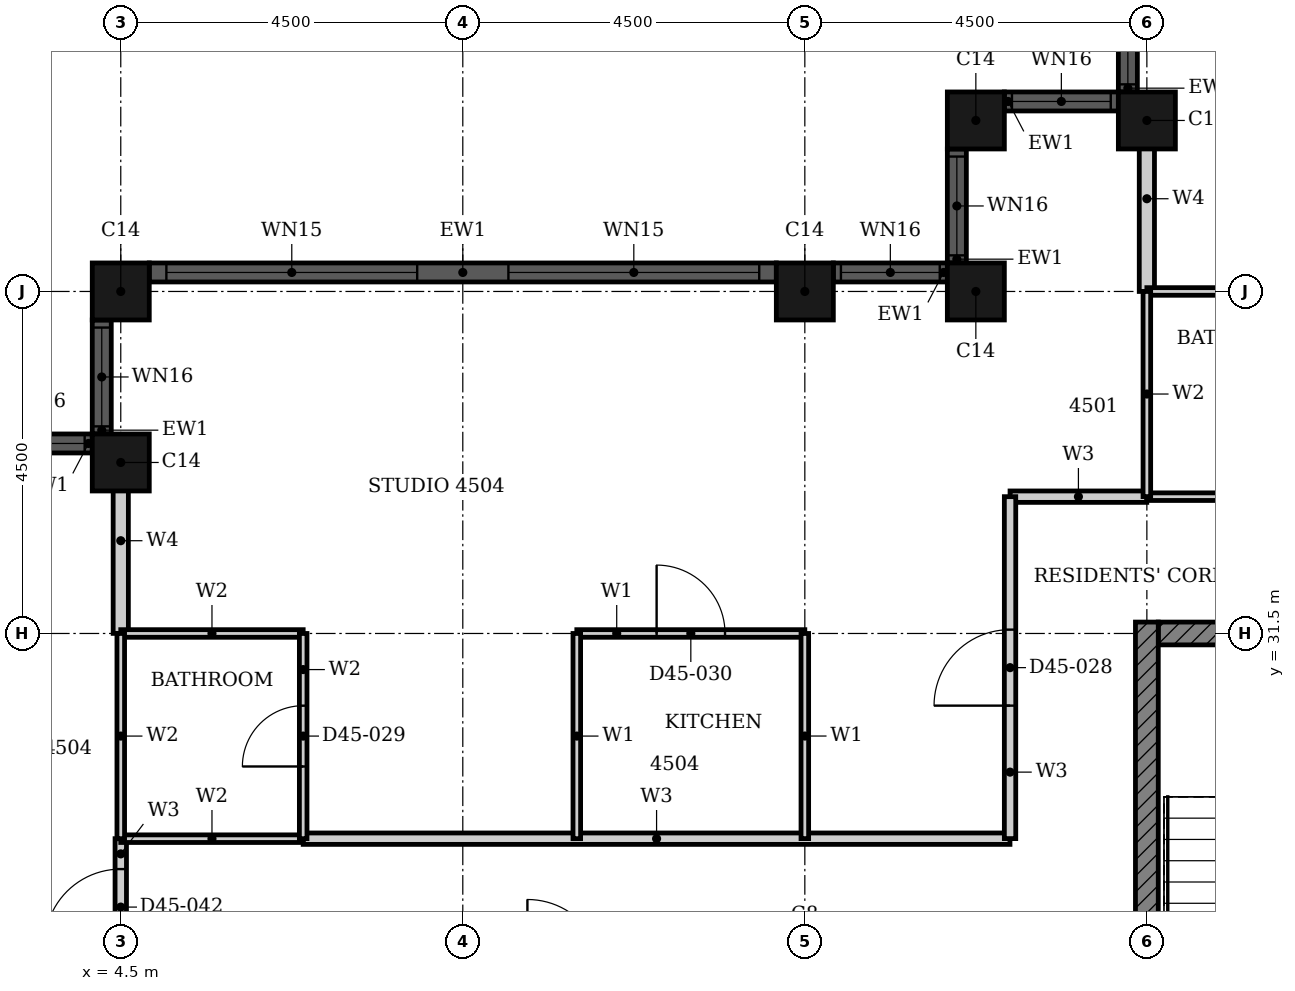
"""IFC4 building model, lengths in metres.
Left out: names, types, materials, properties, quantities, classifications, styles, units other than length and angle.
Written with IfcOpenShell. Run it as: python <this file> out.ifc"""

import sys

from ifc_helpers import new_model, si_unit, direction, frame, frame_2d, origin, origin_2d, place, context, subcontext, project, spatial, rectangle, hollow_rectangle, extrude, element, fill, save


model = new_model("IFC4")
c1 = context("Model", 3, precision=1e-05, world=origin(), true_north=direction((0.0, 1.0)))
c2 = subcontext(c1, "Body", "Model", "MODEL_VIEW")
j1 = project(units=[si_unit("LENGTHUNIT", "METRE"), si_unit("PLANEANGLEUNIT", "RADIAN")], contexts=[c1])
p1 = place(None, origin())
s1 = spatial("IfcSite", under=j1, at=p1, CompositionType="ELEMENT")
p2 = place(p1, origin())
s2 = spatial("IfcBuilding", under=s1, at=p2, CompositionType="ELEMENT")
p3 = place(p2, frame((0.0, 0.0, 180.2)))
s3 = spatial("IfcBuildingStorey", under=s2, at=p3, CompositionType="ELEMENT", Elevation=180.2)
for number, where, z_axis, x_axis in (
    (1, (18.0, 38.25, 0.0), (0.0, 0.0, 1.0), (1.0, 0.0, 0.0)),
    (2, (15.75, 38.25, 0.0), (0.0, 0.0, 1.0), (1.0, 0.0, 0.0)),
    (3, (15.75, 36.0, 0.0), (0.0, 0.0, 1.0), (1.0, 0.0, 0.0)),
    (4, (13.5, 36.0, 0.0), (0.0, 0.0, 1.0), (1.0, 0.0, 0.0)),
    (5, (4.5, 36.0, 0.0), (0.0, 0.0, 1.0), (1.0, 0.0, 0.0)),
    (6, (4.5, 33.75, 0.0), (0.0, 0.0, 1.0), (1.0, 0.0, 0.0)),
):
    element("IfcColumn", number, at=place(p3, frame(where, z_axis=z_axis, x_axis=x_axis)), inside=s3, PredefinedType="COLUMN", context=c2, shape_type="SweptSolid", body=[
        extrude(hollow_rectangle(XDim=0.75, YDim=0.75, WallThickness=0.024, at=origin_2d()), origin(), (0.0, 0.0, 1.0), 3.7),
    ])
p4 = place(p3, frame((17.75, 40.125, 0.0), z_axis=(0.0, 0.0, 1.0), x_axis=(0.0, -1.0, 0.0)))
e7 = element("IfcWall", 7, at=p4, inside=s3, PredefinedType="SOLIDWALL", context=c2, shape_type="SweptSolid", body=[
    extrude(rectangle(XDim=1.5, YDim=0.25, at=frame_2d((0.75, 0.0))), origin(), (0.0, 0.0, 1.0), 3.7),
])
p5 = place(p4, frame((0.1, 0.0, 0.9)))
e8 = element("IfcOpeningElement", 8, at=p5, cuts=e7, PredefinedType="OPENING", context=c2, shape_type="SweptSolid", body=[
    extrude(rectangle(XDim=1.3, YDim=1.85, at=frame_2d((0.65, 0.925))), frame((0.0, 0.135, 0.0), z_axis=(0.0, -1.0, 0.0), x_axis=(1.0, 0.0, 0.0)), (0.0, 0.0, 1.0), 0.27),
])
p6 = place(p3, frame((17.625, 38.5, 0.0), z_axis=(0.0, 0.0, 1.0), x_axis=(-1.0, 0.0, 0.0)))
e9 = element("IfcWall", 9, at=p6, inside=s3, PredefinedType="SOLIDWALL", context=c2, shape_type="SweptSolid", body=[
    extrude(rectangle(XDim=1.5, YDim=0.25, at=frame_2d((0.75, 0.0))), origin(), (0.0, 0.0, 1.0), 3.7),
])
p7 = place(p6, frame((0.1, 0.0, 0.9)))
e10 = element("IfcOpeningElement", 10, at=p7, cuts=e9, PredefinedType="OPENING", context=c2, shape_type="SweptSolid", body=[
    extrude(rectangle(XDim=1.3, YDim=1.85, at=frame_2d((0.65, 0.925))), frame((0.0, 0.135, 0.0), z_axis=(0.0, -1.0, 0.0), x_axis=(1.0, 0.0, 0.0)), (0.0, 0.0, 1.0), 0.27),
])
p8 = place(p3, frame((15.5, 37.875, 0.0), z_axis=(0.0, 0.0, 1.0), x_axis=(0.0, -1.0, 0.0)))
e11 = element("IfcWall", 11, at=p8, inside=s3, PredefinedType="SOLIDWALL", context=c2, shape_type="SweptSolid", body=[
    extrude(rectangle(XDim=1.5, YDim=0.25, at=frame_2d((0.75, 0.0))), origin(), (0.0, 0.0, 1.0), 3.7),
])
p9 = place(p8, frame((0.1, 0.0, 0.9)))
e12 = element("IfcOpeningElement", 12, at=p9, cuts=e11, PredefinedType="OPENING", context=c2, shape_type="SweptSolid", body=[
    extrude(rectangle(XDim=1.3, YDim=1.85, at=frame_2d((0.65, 0.925))), frame((0.0, 0.135, 0.0), z_axis=(0.0, -1.0, 0.0), x_axis=(1.0, 0.0, 0.0)), (0.0, 0.0, 1.0), 0.27),
])
p10 = place(p3, frame((15.375, 36.25, 0.0), z_axis=(0.0, 0.0, 1.0), x_axis=(-1.0, 0.0, 0.0)))
e13 = element("IfcWall", 13, at=p10, inside=s3, PredefinedType="SOLIDWALL", context=c2, shape_type="SweptSolid", body=[
    extrude(rectangle(XDim=1.5, YDim=0.25, at=frame_2d((0.75, 0.0))), origin(), (0.0, 0.0, 1.0), 3.7),
])
p11 = place(p10, frame((0.1, 0.0, 0.9)))
e14 = element("IfcOpeningElement", 14, at=p11, cuts=e13, PredefinedType="OPENING", context=c2, shape_type="SweptSolid", body=[
    extrude(rectangle(XDim=1.3, YDim=1.85, at=frame_2d((0.65, 0.925))), frame((0.0, 0.135, 0.0), z_axis=(0.0, -1.0, 0.0), x_axis=(1.0, 0.0, 0.0)), (0.0, 0.0, 1.0), 0.27),
])
p12 = place(p3, frame((13.125, 36.25, 0.0), z_axis=(0.0, 0.0, 1.0), x_axis=(-1.0, 0.0, 0.0)))
e15 = element("IfcWall", 15, at=p12, inside=s3, PredefinedType="SOLIDWALL", context=c2, shape_type="SweptSolid", body=[
    extrude(rectangle(XDim=8.25, YDim=0.25, at=frame_2d((4.125, 0.0))), origin(), (0.0, 0.0, 1.0), 3.7),
])
p13 = place(p12, frame((0.225, 0.0, 0.45)))
e16 = element("IfcOpeningElement", 16, at=p13, cuts=e15, PredefinedType="OPENING", context=c2, shape_type="SweptSolid", body=[
    extrude(rectangle(XDim=3.3, YDim=2.3, at=frame_2d((1.65, 1.15))), frame((0.0, 0.135, 0.0), z_axis=(0.0, -1.0, 0.0), x_axis=(1.0, 0.0, 0.0)), (0.0, 0.0, 1.0), 0.27),
])
p14 = place(p12, frame((4.725, 0.0, 0.45)))
e17 = element("IfcOpeningElement", 17, at=p14, cuts=e15, PredefinedType="OPENING", context=c2, shape_type="SweptSolid", body=[
    extrude(rectangle(XDim=3.3, YDim=2.3, at=frame_2d((1.65, 1.15))), frame((0.0, 0.135, 0.0), z_axis=(0.0, -1.0, 0.0), x_axis=(1.0, 0.0, 0.0)), (0.0, 0.0, 1.0), 0.27),
])
p15 = place(p3, frame((4.25, 35.625, 0.0), z_axis=(0.0, 0.0, 1.0), x_axis=(0.0, -1.0, 0.0)))
e18 = element("IfcWall", 18, at=p15, inside=s3, PredefinedType="SOLIDWALL", context=c2, shape_type="SweptSolid", body=[
    extrude(rectangle(XDim=1.5, YDim=0.25, at=frame_2d((0.75, 0.0))), origin(), (0.0, 0.0, 1.0), 3.7),
])
p16 = place(p15, frame((0.1, 0.0, 0.9)))
e19 = element("IfcOpeningElement", 19, at=p16, cuts=e18, PredefinedType="OPENING", context=c2, shape_type="SweptSolid", body=[
    extrude(rectangle(XDim=1.3, YDim=1.85, at=frame_2d((0.65, 0.925))), frame((0.0, 0.135, 0.0), z_axis=(0.0, -1.0, 0.0), x_axis=(1.0, 0.0, 0.0)), (0.0, 0.0, 1.0), 0.27),
])
p17 = place(p3, frame((4.125, 34.0, 0.0), z_axis=(0.0, 0.0, 1.0), x_axis=(-1.0, 0.0, 0.0)))
e20 = element("IfcWall", 20, at=p17, inside=s3, PredefinedType="SOLIDWALL", context=c2, shape_type="SweptSolid", body=[
    extrude(rectangle(XDim=1.5, YDim=0.25, at=frame_2d((0.75, 0.0))), origin(), (0.0, 0.0, 1.0), 3.7),
])
p18 = place(p17, frame((0.1, 0.0, 0.9)))
e21 = element("IfcOpeningElement", 21, at=p18, cuts=e20, PredefinedType="OPENING", context=c2, shape_type="SweptSolid", body=[
    extrude(rectangle(XDim=1.3, YDim=1.85, at=frame_2d((0.65, 0.925))), frame((0.0, 0.135, 0.0), z_axis=(0.0, -1.0, 0.0), x_axis=(1.0, 0.0, 0.0)), (0.0, 0.0, 1.0), 0.27),
])
p19 = place(p3, frame((18.15, 31.5, 0.0), z_axis=(0.0, 0.0, 1.0), x_axis=(1.0, 0.0, 0.0)))
e22 = element("IfcWall", 22, at=p19, inside=s3, PredefinedType="SHEAR", context=c2, shape_type="SweptSolid", body=[
    extrude(rectangle(XDim=9.368, YDim=0.3, at=frame_2d((4.684, 0.0))), origin(), (0.0, 0.0, 1.0), 3.4),
])
p20 = place(p19, frame((4.736, 0.0, 0.0)))
e23 = element("IfcOpeningElement", 23, at=p20, cuts=e22, PredefinedType="OPENING", context=c2, shape_type="SweptSolid", body=[
    extrude(rectangle(XDim=1.8, YDim=2.1, at=frame_2d((0.9, 1.05))), frame((0.0, 0.16, 0.0), z_axis=(0.0, -1.0, 0.0), x_axis=(1.0, 0.0, 0.0)), (0.0, 0.0, 1.0), 0.32),
])
p21 = place(p3, frame((18.0, 22.35, 0.0), z_axis=(0.0, 0.0, 1.0), x_axis=(0.0, 1.0, 0.0)))
e24 = element("IfcWall", 24, at=p21, inside=s3, PredefinedType="SHEAR", context=c2, shape_type="SweptSolid", body=[
    extrude(rectangle(XDim=9.3, YDim=0.3, at=frame_2d((4.65, 0.0))), origin(), (0.0, 0.0, 1.0), 3.4),
])
p22 = place(p3, frame((6.9, 28.8, 0.0), z_axis=(0.0, 0.0, 1.0), x_axis=(1.0, 0.0, 0.0)))
e25 = element("IfcWall", 25, at=p22, inside=s3, PredefinedType="PARTITIONING", context=c2, shape_type="SweptSolid", body=[
    extrude(rectangle(XDim=9.299, YDim=0.15, at=frame_2d((4.649, 0.0))), origin(), (0.0, 0.0, 1.0), 3.4),
])
p23 = place(p3, frame((16.2, 33.3, 0.0), z_axis=(0.0, 0.0, 1.0), x_axis=(1.0, 0.0, 0.0)))
e26 = element("IfcWall", 26, at=p23, inside=s3, PredefinedType="PARTITIONING", context=c2, shape_type="SweptSolid", body=[
    extrude(rectangle(XDim=1.799, YDim=0.15, at=frame_2d((0.899, 0.0))), origin(), (0.0, 0.0, 1.0), 3.4),
])
p24 = place(p3, frame((16.2, 28.801, 0.0), z_axis=(0.0, 0.0, 1.0), x_axis=(0.0, 1.0, 0.0)))
e27 = element("IfcWall", 27, at=p24, inside=s3, PredefinedType="PARTITIONING", context=c2, shape_type="SweptSolid", body=[
    extrude(rectangle(XDim=4.499, YDim=0.15, at=frame_2d((2.25, 0.0))), origin(), (0.0, 0.0, 1.0), 3.4),
])
p25 = place(p24, frame((1.75, 0.0, 0.0)))
e28 = element("IfcOpeningElement", 28, at=p25, cuts=e27, PredefinedType="OPENING", context=c2, shape_type="SweptSolid", body=[
    extrude(rectangle(XDim=1.0, YDim=2.2, at=frame_2d((0.5, 1.1))), frame((0.0, 0.085, 0.0), z_axis=(0.0, -1.0, 0.0), x_axis=(1.0, 0.0, 0.0)), (0.0, 0.0, 1.0), 0.17),
])
p26 = place(p3, frame((4.5, 27.0, 0.0), z_axis=(0.0, 0.0, 1.0), x_axis=(0.0, 1.0, 0.0)))
e29 = element("IfcWall", 29, at=p26, inside=s3, PredefinedType="PARTITIONING", context=c2, shape_type="SweptSolid", body=[
    extrude(rectangle(XDim=1.8, YDim=0.15, at=frame_2d((0.9, 0.0))), origin(), (0.0, 0.0, 1.0), 3.4),
])
p27 = place(p26, frame((0.4, 0.0, 0.0)))
e30 = element("IfcOpeningElement", 30, at=p27, cuts=e29, PredefinedType="OPENING", context=c2, shape_type="SweptSolid", body=[
    extrude(rectangle(XDim=1.0, YDim=2.2, at=frame_2d((0.5, 1.1))), frame((0.0, 0.085, 0.0), z_axis=(0.0, -1.0, 0.0), x_axis=(1.0, 0.0, 0.0)), (0.0, 0.0, 1.0), 0.17),
])
p28 = place(p3, frame((10.5, 31.5, 0.0), z_axis=(0.0, 0.0, 1.0), x_axis=(1.0, 0.0, 0.0)))
e31 = element("IfcWall", 31, at=p28, inside=s3, PredefinedType="PARTITIONING", context=c2, shape_type="SweptSolid", body=[
    extrude(rectangle(XDim=3.0, YDim=0.1, at=frame_2d((1.5, 0.0))), origin(), (0.0, 0.0, 1.0), 2.68),
])
p29 = place(p28, frame((1.05, 0.0, 0.0)))
e32 = element("IfcOpeningElement", 32, at=p29, cuts=e31, PredefinedType="OPENING", context=c2, shape_type="SweptSolid", body=[
    extrude(rectangle(XDim=0.9, YDim=2.1, at=frame_2d((0.45, 1.05))), frame((0.0, 0.06, 0.0), z_axis=(0.0, -1.0, 0.0), x_axis=(1.0, 0.0, 0.0)), (0.0, 0.0, 1.0), 0.12),
])
p30 = place(p3, frame((10.5, 28.8, 0.0), z_axis=(0.0, 0.0, 1.0), x_axis=(0.0, 1.0, 0.0)))
e33 = element("IfcWall", 33, at=p30, inside=s3, PredefinedType="PARTITIONING", context=c2, shape_type="SweptSolid", body=[
    extrude(rectangle(XDim=2.7, YDim=0.1, at=frame_2d((1.35, 0.0))), origin(), (0.0, 0.0, 1.0), 3.4),
])
p31 = place(p3, frame((13.5, 28.801, 0.0), z_axis=(0.0, 0.0, 1.0), x_axis=(0.0, 1.0, 0.0)))
e34 = element("IfcWall", 34, at=p31, inside=s3, PredefinedType="PARTITIONING", context=c2, shape_type="SweptSolid", body=[
    extrude(rectangle(XDim=2.699, YDim=0.1, at=frame_2d((1.35, 0.0))), origin(), (0.0, 0.0, 1.0), 2.48),
])
p32 = place(p3, frame((18.0, 36.0, 0.0), z_axis=(0.0, 0.0, 1.0), x_axis=(0.0, 1.0, 0.0)))
e35 = element("IfcWall", 35, at=p32, inside=s3, PredefinedType="PARTITIONING", context=c2, shape_type="SweptSolid", body=[
    extrude(rectangle(XDim=2.44, YDim=0.2, at=frame_2d((1.22, 0.0))), origin(), (0.0, 0.0, 1.0), 3.4),
])
p33 = place(p3, frame((4.5, 31.501, 0.0), z_axis=(0.0, 0.0, 1.0), x_axis=(0.0, 1.0, 0.0)))
e36 = element("IfcWall", 36, at=p33, inside=s3, PredefinedType="PARTITIONING", context=c2, shape_type="SweptSolid", body=[
    extrude(rectangle(XDim=2.439, YDim=0.2, at=frame_2d((1.219, 0.0))), origin(), (0.0, 0.0, 1.0), 3.4),
])
p34 = place(p3, frame((4.5, 28.8, 0.0), z_axis=(0.0, 0.0, 1.0), x_axis=(1.0, 0.0, 0.0)))
e37 = element("IfcWall", 37, at=p34, inside=s3, PredefinedType="PARTITIONING", context=c2, shape_type="SweptSolid", body=[
    extrude(rectangle(XDim=2.4, YDim=0.1, at=frame_2d((1.2, 0.0))), origin(), (0.0, 0.0, 1.0), 3.4),
])
p35 = place(p3, frame((4.5, 31.5, 0.0), z_axis=(0.0, 0.0, 1.0), x_axis=(1.0, 0.0, 0.0)))
e38 = element("IfcWall", 38, at=p35, inside=s3, PredefinedType="PARTITIONING", context=c2, shape_type="SweptSolid", body=[
    extrude(rectangle(XDim=2.4, YDim=0.1, at=frame_2d((1.2, 0.0))), origin(), (0.0, 0.0, 1.0), 2.68),
])
for number, where, z_axis, x_axis in (
    (39, (18.0, 33.3, 0.0), (0.0, 0.0, 1.0), (1.0, 0.0, 0.0)),
    (40, (18.0, 36.0, 0.0), (0.0, 0.0, 1.0), (1.0, 0.0, 0.0)),
):
    element("IfcWall", number, at=place(p3, frame(where, z_axis=z_axis, x_axis=x_axis)), inside=s3, PredefinedType="PARTITIONING", context=c2, shape_type="SweptSolid", body=[
        extrude(rectangle(XDim=2.4, YDim=0.1, at=frame_2d((1.2, 0.0))), origin(), (0.0, 0.0, 1.0), 3.4),
    ])
p36 = place(p3, frame((18.0, 33.301, 0.0), z_axis=(0.0, 0.0, 1.0), x_axis=(0.0, 1.0, 0.0)))
e41 = element("IfcWall", 41, at=p36, inside=s3, PredefinedType="PARTITIONING", context=c2, shape_type="SweptSolid", body=[
    extrude(rectangle(XDim=2.699, YDim=0.1, at=frame_2d((1.35, 0.0))), origin(), (0.0, 0.0, 1.0), 3.4),
])
p37 = place(p3, frame((4.5, 28.8, 0.0), z_axis=(0.0, 0.0, 1.0), x_axis=(0.0, 1.0, 0.0)))
e42 = element("IfcWall", 42, at=p37, inside=s3, PredefinedType="PARTITIONING", context=c2, shape_type="SweptSolid", body=[
    extrude(rectangle(XDim=2.7, YDim=0.1, at=frame_2d((1.35, 0.0))), origin(), (0.0, 0.0, 1.0), 3.4),
])
p38 = place(p3, frame((6.9, 28.8, 0.0), z_axis=(0.0, 0.0, 1.0), x_axis=(0.0, 1.0, 0.0)))
e43 = element("IfcWall", 43, at=p38, inside=s3, PredefinedType="PARTITIONING", context=c2, shape_type="SweptSolid", body=[
    extrude(rectangle(XDim=2.7, YDim=0.1, at=frame_2d((1.35, 0.0))), origin(), (0.0, 0.0, 1.0), 3.4),
])
p39 = place(p38, frame((0.95, 0.0, 0.0)))
e44 = element("IfcOpeningElement", 44, at=p39, cuts=e43, PredefinedType="OPENING", context=c2, shape_type="SweptSolid", body=[
    extrude(rectangle(XDim=0.8, YDim=2.1, at=frame_2d((0.4, 1.05))), frame((0.0, 0.06, 0.0), z_axis=(0.0, -1.0, 0.0), x_axis=(1.0, 0.0, 0.0)), (0.0, 0.0, 1.0), 0.12),
])
p40 = place(p5, origin())
e45 = element("IfcWindow", 45, at=p40, inside=s3, PartitioningType="SINGLE_PANEL", PredefinedType="WINDOW", context=c2, shape_type="SweptSolid", body=[
    extrude(rectangle(XDim=1.3, YDim=1.85, at=frame_2d((0.65, 0.925))), frame((0.0, 0.03, 0.0), z_axis=(0.0, -1.0, 0.0), x_axis=(1.0, 0.0, 0.0)), (0.0, 0.0, 1.0), 0.06),
])
fill(e8, e45)
p41 = place(p7, origin())
e46 = element("IfcWindow", 46, at=p41, inside=s3, PartitioningType="SINGLE_PANEL", PredefinedType="WINDOW", context=c2, shape_type="SweptSolid", body=[
    extrude(rectangle(XDim=1.3, YDim=1.85, at=frame_2d((0.65, 0.925))), frame((0.0, 0.03, 0.0), z_axis=(0.0, -1.0, 0.0), x_axis=(1.0, 0.0, 0.0)), (0.0, 0.0, 1.0), 0.06),
])
fill(e10, e46)
p42 = place(p9, origin())
e47 = element("IfcWindow", 47, at=p42, inside=s3, PartitioningType="SINGLE_PANEL", PredefinedType="WINDOW", context=c2, shape_type="SweptSolid", body=[
    extrude(rectangle(XDim=1.3, YDim=1.85, at=frame_2d((0.65, 0.925))), frame((0.0, 0.03, 0.0), z_axis=(0.0, -1.0, 0.0), x_axis=(1.0, 0.0, 0.0)), (0.0, 0.0, 1.0), 0.06),
])
fill(e12, e47)
p43 = place(p11, origin())
e48 = element("IfcWindow", 48, at=p43, inside=s3, PartitioningType="SINGLE_PANEL", PredefinedType="WINDOW", context=c2, shape_type="SweptSolid", body=[
    extrude(rectangle(XDim=1.3, YDim=1.85, at=frame_2d((0.65, 0.925))), frame((0.0, 0.03, 0.0), z_axis=(0.0, -1.0, 0.0), x_axis=(1.0, 0.0, 0.0)), (0.0, 0.0, 1.0), 0.06),
])
fill(e14, e48)
p44 = place(p13, origin())
e49 = element("IfcWindow", 49, at=p44, inside=s3, PartitioningType="SINGLE_PANEL", PredefinedType="WINDOW", context=c2, shape_type="SweptSolid", body=[
    extrude(rectangle(XDim=3.3, YDim=2.3, at=frame_2d((1.65, 1.15))), frame((0.0, 0.03, 0.0), z_axis=(0.0, -1.0, 0.0), x_axis=(1.0, 0.0, 0.0)), (0.0, 0.0, 1.0), 0.06),
])
fill(e16, e49)
p45 = place(p14, origin())
e50 = element("IfcWindow", 50, at=p45, inside=s3, PartitioningType="SINGLE_PANEL", PredefinedType="WINDOW", context=c2, shape_type="SweptSolid", body=[
    extrude(rectangle(XDim=3.3, YDim=2.3, at=frame_2d((1.65, 1.15))), frame((0.0, 0.03, 0.0), z_axis=(0.0, -1.0, 0.0), x_axis=(1.0, 0.0, 0.0)), (0.0, 0.0, 1.0), 0.06),
])
fill(e17, e50)
p46 = place(p16, origin())
e51 = element("IfcWindow", 51, at=p46, inside=s3, PartitioningType="SINGLE_PANEL", PredefinedType="WINDOW", context=c2, shape_type="SweptSolid", body=[
    extrude(rectangle(XDim=1.3, YDim=1.85, at=frame_2d((0.65, 0.925))), frame((0.0, 0.03, 0.0), z_axis=(0.0, -1.0, 0.0), x_axis=(1.0, 0.0, 0.0)), (0.0, 0.0, 1.0), 0.06),
])
fill(e19, e51)
p47 = place(p18, origin())
e52 = element("IfcWindow", 52, at=p47, inside=s3, PartitioningType="SINGLE_PANEL", PredefinedType="WINDOW", context=c2, shape_type="SweptSolid", body=[
    extrude(rectangle(XDim=1.3, YDim=1.85, at=frame_2d((0.65, 0.925))), frame((0.0, 0.03, 0.0), z_axis=(0.0, -1.0, 0.0), x_axis=(1.0, 0.0, 0.0)), (0.0, 0.0, 1.0), 0.06),
])
fill(e21, e52)
p48 = place(p25, origin())
e53 = element("IfcDoor", 53, at=p48, inside=s3, OperationType="SINGLE_SWING_RIGHT", PredefinedType="DOOR", context=c2, shape_type="SweptSolid", body=[
    extrude(rectangle(XDim=1.0, YDim=2.2, at=frame_2d((0.5, 1.1))), frame((0.0, 0.025, 0.0), z_axis=(0.0, -1.0, 0.0), x_axis=(1.0, 0.0, 0.0)), (0.0, 0.0, 1.0), 0.05),
])
fill(e28, e53)
p49 = place(p39, origin())
e54 = element("IfcDoor", 54, at=p49, inside=s3, OperationType="SINGLE_SWING_RIGHT", PredefinedType="DOOR", context=c2, shape_type="SweptSolid", body=[
    extrude(rectangle(XDim=0.8, YDim=2.1, at=frame_2d((0.4, 1.05))), frame((0.0, 0.025, 0.0), z_axis=(0.0, -1.0, 0.0), x_axis=(1.0, 0.0, 0.0)), (0.0, 0.0, 1.0), 0.05),
])
fill(e44, e54)
p50 = place(p29, origin())
e55 = element("IfcDoor", 55, at=p50, inside=s3, OperationType="SINGLE_SWING_LEFT", PredefinedType="DOOR", context=c2, shape_type="SweptSolid", body=[
    extrude(rectangle(XDim=0.9, YDim=2.1, at=frame_2d((0.45, 1.05))), frame((0.0, 0.025, 0.0), z_axis=(0.0, -1.0, 0.0), x_axis=(1.0, 0.0, 0.0)), (0.0, 0.0, 1.0), 0.05),
])
fill(e32, e55)
p51 = place(p27, origin())
e56 = element("IfcDoor", 56, at=p51, inside=s3, OperationType="SINGLE_SWING_LEFT", PredefinedType="DOOR", context=c2, shape_type="SweptSolid", body=[
    extrude(rectangle(XDim=1.0, YDim=2.2, at=frame_2d((0.5, 1.1))), frame((0.0, 0.025, 0.0), z_axis=(0.0, -1.0, 0.0), x_axis=(1.0, 0.0, 0.0)), (0.0, 0.0, 1.0), 0.05),
])
fill(e30, e56)
save(model, sys.argv[1])
